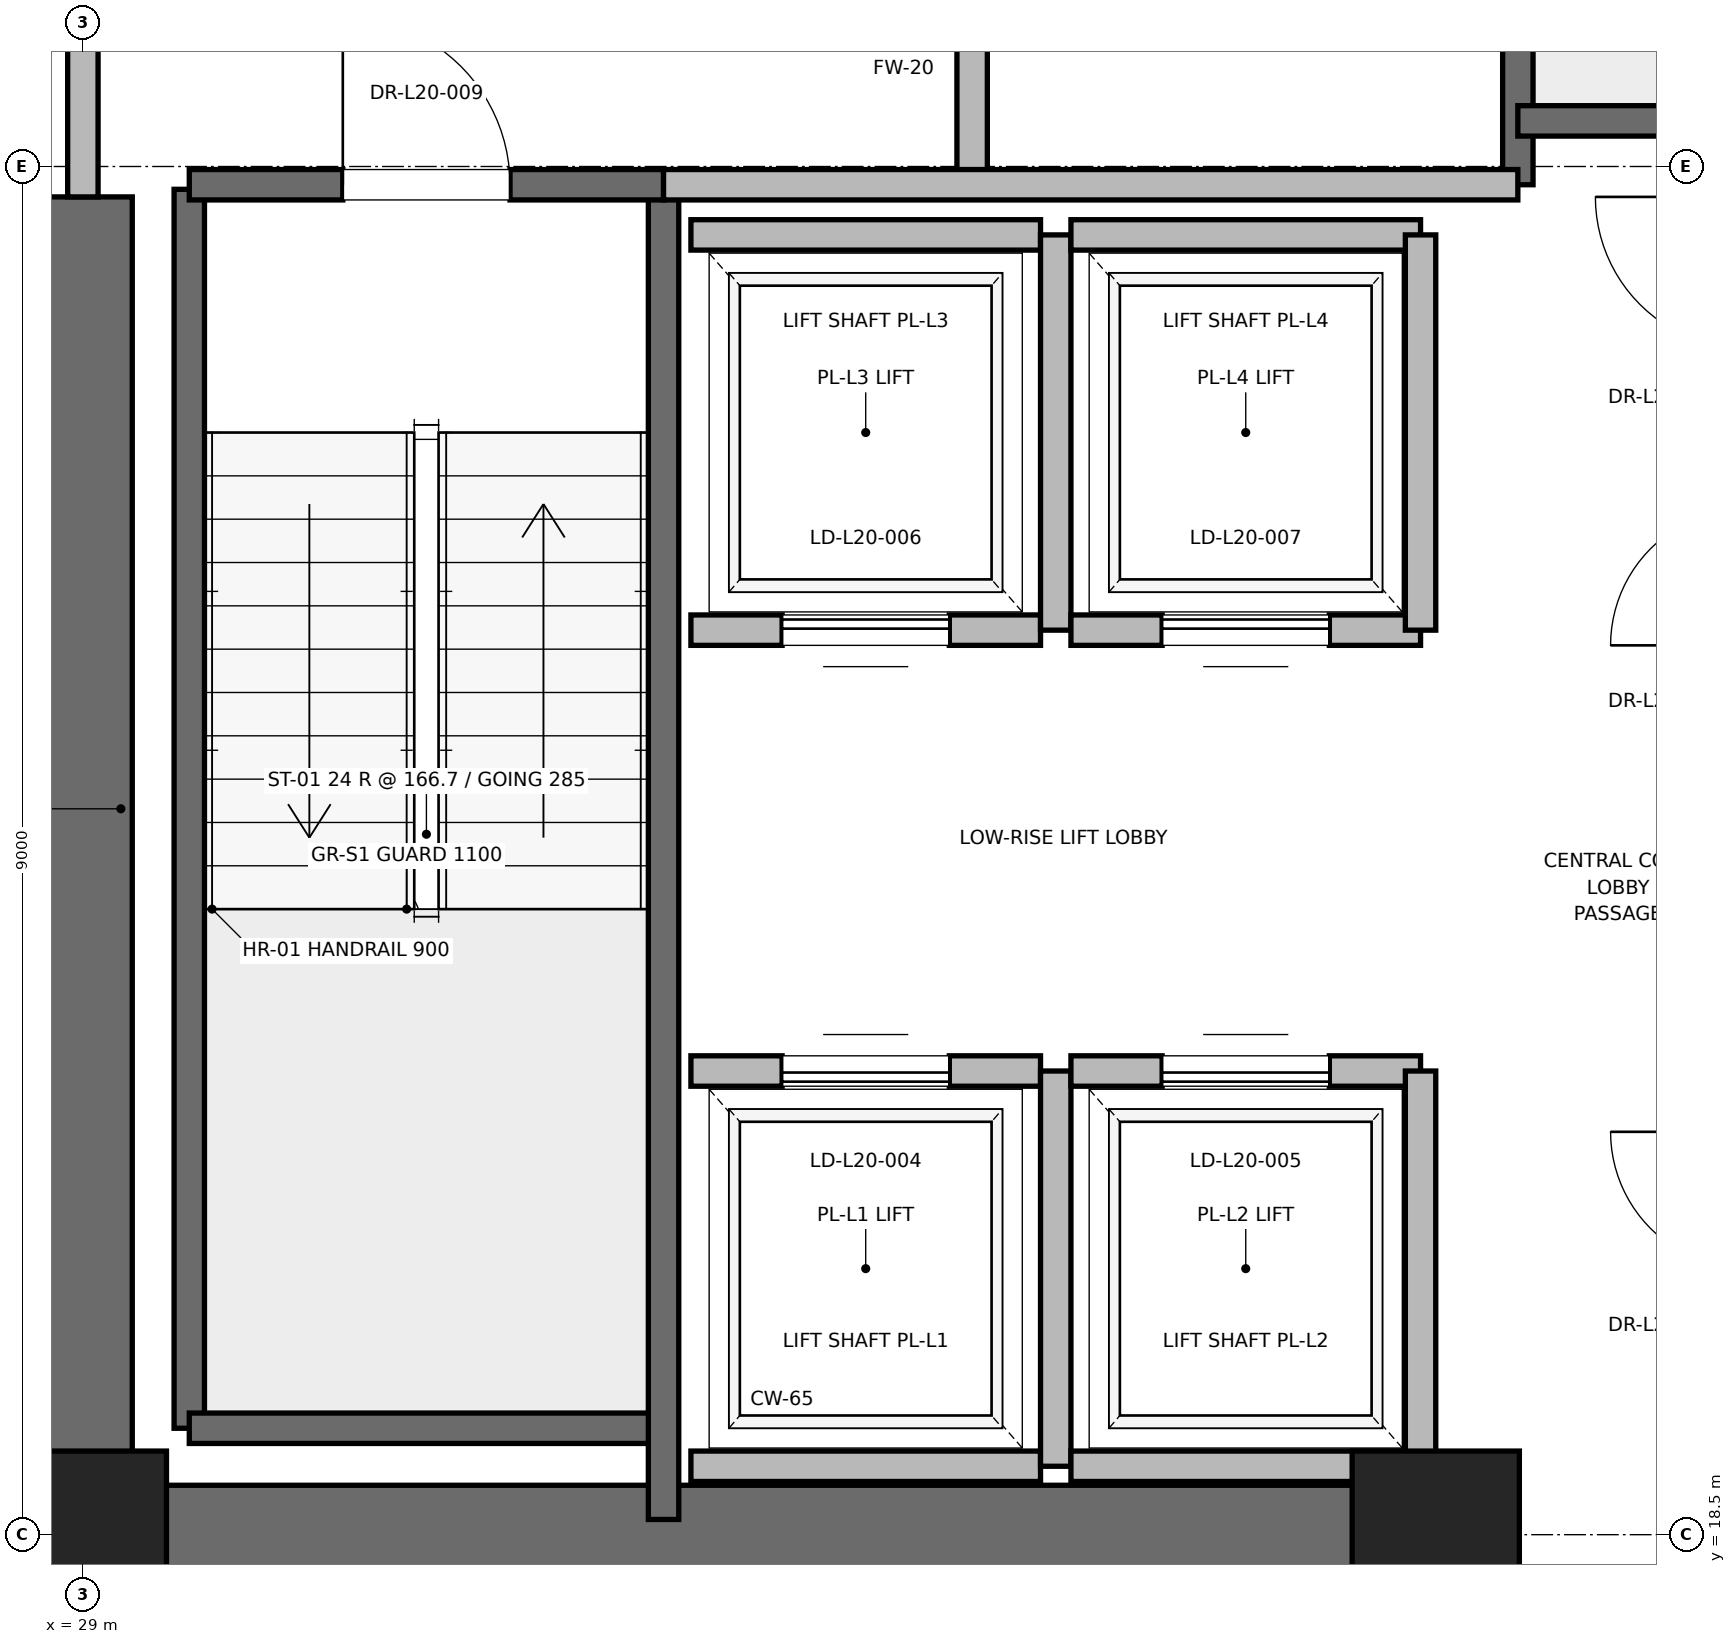
"""IFC4 building model, lengths in metres.
Left out: names, types, materials, properties, quantities, classifications, styles, units other than length and angle.
Written with IfcOpenShell. Run it as: python <this file> out.ifc"""

import sys

from ifc_helpers import new_model, si_unit, direction, frame, frame_2d, origin, origin_2d, place, context, subcontext, project, spatial, rectangle, extrude, element, fill, save


model = new_model("IFC4")
c1 = context("Model", 3, precision=1e-05, world=origin(), true_north=direction((0.0, 1.0)))
c2 = subcontext(c1, "Body", "Model", "MODEL_VIEW")
j1 = project(units=[si_unit("LENGTHUNIT", "METRE"), si_unit("PLANEANGLEUNIT", "RADIAN")], contexts=[c1])
p1 = place(None, origin())
s1 = spatial("IfcSite", under=j1, at=p1, CompositionType="ELEMENT")
p2 = place(p1, origin())
s2 = spatial("IfcBuilding", under=s1, at=p2, CompositionType="ELEMENT")
p3 = place(p2, frame((0.0, 0.0, 87.6)))
s3 = spatial("IfcBuildingStorey", under=s2, at=p3, CompositionType="ELEMENT", Elevation=87.6)
for number, where, z_axis, x_axis in (
    (1, (29.0, 18.5, 0.0), (0.0, 0.0, 1.0), (1.0, 0.0, 0.0)),
    (2, (37.9, 18.5, 0.0), (0.0, 0.0, 1.0), (1.0, 0.0, 0.0)),
):
    element("IfcColumn", number, at=place(p3, frame(where, z_axis=z_axis, x_axis=x_axis)), inside=s3, PredefinedType="PILASTER", context=c2, shape_type="SweptSolid", body=[
        extrude(rectangle(XDim=1.1, YDim=1.1, at=origin_2d()), origin(), (0.0, 0.0, 1.0), 4.0),
    ])
p4 = place(p3, frame((29.0, 18.5, 0.0), z_axis=(0.0, 0.0, 1.0), x_axis=(1.0, 0.0, 0.0)))
e3 = element("IfcWall", 3, at=p4, inside=s3, PredefinedType="SHEAR", context=c2, shape_type="SweptSolid", body=[
    extrude(rectangle(XDim=9.2, YDim=0.65, at=frame_2d((4.6, 0.0))), origin(), (0.0, 0.0, 1.0), 3.76),
])
p5 = place(p3, frame((29.0, 18.5, 0.0), z_axis=(0.0, 0.0, 1.0), x_axis=(0.0, 1.0, 0.0)))
e4 = element("IfcWall", 4, at=p5, inside=s3, PredefinedType="SHEAR", context=c2, shape_type="SweptSolid", body=[
    extrude(rectangle(XDim=8.8, YDim=0.65, at=frame_2d((4.4, 0.0))), origin(), (0.0, 0.0, 1.0), 3.76),
])
p6 = place(p3, frame((29.7, 19.2, 0.0), z_axis=(0.0, 0.0, 1.0), x_axis=(0.0, 1.0, 0.0)))
e5 = element("IfcWall", 5, at=p6, inside=s3, PredefinedType="SOLIDWALL", context=c2, shape_type="SweptSolid", body=[
    extrude(rectangle(XDim=8.15, YDim=0.2, at=frame_2d((4.075, 0.0))), origin(), (0.0, 0.0, 1.0), 3.76),
])
p7 = place(p3, frame((29.7, 19.2, 0.0), z_axis=(0.0, 0.0, 1.0), x_axis=(1.0, 0.0, 0.0)))
e6 = element("IfcWall", 6, at=p7, inside=s3, PredefinedType="SOLIDWALL", context=c2, shape_type="SweptSolid", body=[
    extrude(rectangle(XDim=3.12, YDim=0.2, at=frame_2d((1.56, 0.0))), origin(), (0.0, 0.0, 1.0), 3.76),
])
p8 = place(p3, frame((32.82, 18.6, 0.0), z_axis=(0.0, 0.0, 1.0), x_axis=(0.0, 1.0, 0.0)))
e7 = element("IfcWall", 7, at=p8, inside=s3, PredefinedType="SOLIDWALL", context=c2, shape_type="SweptSolid", body=[
    extrude(rectangle(XDim=8.78, YDim=0.2, at=frame_2d((4.39, 0.0))), origin(), (0.0, 0.0, 1.0), 3.76),
])
p9 = place(p3, frame((29.7, 27.38, 0.0), z_axis=(0.0, 0.0, 1.0), x_axis=(1.0, 0.0, 0.0)))
e8 = element("IfcWall", 8, at=p9, inside=s3, PredefinedType="SOLIDWALL", context=c2, shape_type="SweptSolid", body=[
    extrude(rectangle(XDim=3.12, YDim=0.2, at=frame_2d((1.56, 0.0))), origin(), (0.0, 0.0, 1.0), 3.76),
])
p10 = place(p9, frame((1.01, 0.0, 0.0)))
e9 = element("IfcOpeningElement", 9, at=p10, cuts=e8, PredefinedType="OPENING", context=c2, shape_type="SweptSolid", body=[
    extrude(rectangle(XDim=1.1, YDim=2.15, at=frame_2d((0.55, 1.075))), frame((0.0, 0.1, 0.0), z_axis=(0.0, -1.0, 0.0), x_axis=(1.0, 0.0, 0.0)), (0.0, 0.0, 1.0), 0.2),
])
p11 = place(p3, frame((38.44, 27.38, 0.0), z_axis=(0.0, 0.0, 1.0), x_axis=(0.0, 1.0, 0.0)))
e10 = element("IfcWall", 10, at=p11, inside=s3, PredefinedType="SOLIDWALL", context=c2, shape_type="SweptSolid", body=[
    extrude(rectangle(XDim=8.87, YDim=0.2, at=frame_2d((4.435, 0.0))), origin(), (0.0, 0.0, 1.0), 3.76),
])
p12 = place(p3, frame((38.44, 27.8, 0.0), z_axis=(0.0, 0.0, 1.0), x_axis=(1.0, 0.0, 0.0)))
e11 = element("IfcWall", 11, at=p12, inside=s3, PredefinedType="SOLIDWALL", context=c2, shape_type="SweptSolid", body=[
    extrude(rectangle(XDim=3.32, YDim=0.2, at=frame_2d((1.66, 0.0))), origin(), (0.0, 0.0, 1.0), 3.76),
])
p13 = place(p3, frame((34.85, 27.38, 0.0), z_axis=(0.0, 0.0, 1.0), x_axis=(0.0, 1.0, 0.0)))
e12 = element("IfcWall", 12, at=p13, inside=s3, PredefinedType="PARTITIONING", context=c2, shape_type="SweptSolid", body=[
    extrude(rectangle(XDim=3.37, YDim=0.2, at=frame_2d((1.685, 0.0))), origin(), (0.0, 0.0, 1.0), 3.76),
])
p14 = place(p13, frame((1.11, 0.0, 0.0)))
e13 = element("IfcOpeningElement", 13, at=p14, cuts=e12, PredefinedType="OPENING", context=c2, shape_type="SweptSolid", body=[
    extrude(rectangle(XDim=1.15, YDim=2.2, at=frame_2d((0.575, 1.1))), frame((0.0, 0.1, 0.0), z_axis=(0.0, -1.0, 0.0), x_axis=(1.0, 0.0, 0.0)), (0.0, 0.0, 1.0), 0.2),
])
p15 = place(p3, frame((29.0, 27.3, 0.0), z_axis=(0.0, 0.0, 1.0), x_axis=(0.0, 1.0, 0.0)))
e14 = element("IfcWall", 14, at=p15, inside=s3, PredefinedType="PARTITIONING", context=c2, shape_type="SweptSolid", body=[
    extrude(rectangle(XDim=3.4, YDim=0.2, at=frame_2d((1.7, 0.0))), origin(), (0.0, 0.0, 1.0), 2.54),
])
p16 = place(p15, frame((1.125, 0.0, 0.0)))
e15 = element("IfcOpeningElement", 15, at=p16, cuts=e14, PredefinedType="OPENING", context=c2, shape_type="SweptSolid", body=[
    extrude(rectangle(XDim=1.15, YDim=2.2, at=frame_2d((0.575, 1.1))), frame((0.0, 0.1, 0.0), z_axis=(0.0, -1.0, 0.0), x_axis=(1.0, 0.0, 0.0)), (0.0, 0.0, 1.0), 0.2),
])
p17 = place(p3, frame((32.82, 27.38, 0.0), z_axis=(0.0, 0.0, 1.0), x_axis=(1.0, 0.0, 0.0)))
e16 = element("IfcWall", 16, at=p17, inside=s3, PredefinedType="PARTITIONING", context=c2, shape_type="SweptSolid", body=[
    extrude(rectangle(XDim=5.62, YDim=0.2, at=frame_2d((2.81, 0.0))), origin(), (0.0, 0.0, 1.0), 3.76),
])
p18 = place(p3, frame((33.0, 18.95, 0.0), z_axis=(0.0, 0.0, 1.0), x_axis=(1.0, 0.0, 0.0)))
e17 = element("IfcWall", 17, at=p18, inside=s3, PredefinedType="SOLIDWALL", context=c2, shape_type="SweptSolid", body=[
    extrude(rectangle(XDim=2.3, YDim=0.2, at=frame_2d((1.15, 0.0))), origin(), (0.0, 0.0, 1.0), 3.76),
])
p19 = place(p3, frame((35.3, 21.55, 0.0), z_axis=(0.0, 0.0, 1.0), x_axis=(-1.0, 0.0, 0.0)))
e18 = element("IfcWall", 18, at=p19, inside=s3, PredefinedType="SOLIDWALL", context=c2, shape_type="SweptSolid", body=[
    extrude(rectangle(XDim=2.3, YDim=0.2, at=frame_2d((1.15, 0.0))), origin(), (0.0, 0.0, 1.0), 3.76),
])
p20 = place(p19, frame((0.6, 0.0, 0.0)))
e19 = element("IfcOpeningElement", 19, at=p20, cuts=e18, PredefinedType="OPENING", context=c2, shape_type="SweptSolid", body=[
    extrude(rectangle(XDim=1.1, YDim=2.2, at=frame_2d((0.55, 1.1))), frame((0.0, 0.1, 0.0), z_axis=(0.0, -1.0, 0.0), x_axis=(1.0, 0.0, 0.0)), (0.0, 0.0, 1.0), 0.2),
])
p21 = place(p3, frame((35.4, 18.95, 0.0), z_axis=(0.0, 0.0, 1.0), x_axis=(0.0, 1.0, 0.0)))
e20 = element("IfcWall", 20, at=p21, inside=s3, PredefinedType="SOLIDWALL", context=c2, shape_type="SweptSolid", body=[
    extrude(rectangle(XDim=2.6, YDim=0.2, at=frame_2d((1.3, 0.0))), origin(), (0.0, 0.0, 1.0), 3.76),
])
p22 = place(p3, frame((35.5, 18.95, 0.0), z_axis=(0.0, 0.0, 1.0), x_axis=(1.0, 0.0, 0.0)))
e21 = element("IfcWall", 21, at=p22, inside=s3, PredefinedType="SOLIDWALL", context=c2, shape_type="SweptSolid", body=[
    extrude(rectangle(XDim=2.3, YDim=0.2, at=frame_2d((1.15, 0.0))), origin(), (0.0, 0.0, 1.0), 2.54),
])
p23 = place(p3, frame((37.8, 21.55, 0.0), z_axis=(0.0, 0.0, 1.0), x_axis=(-1.0, 0.0, 0.0)))
e22 = element("IfcWall", 22, at=p23, inside=s3, PredefinedType="SOLIDWALL", context=c2, shape_type="SweptSolid", body=[
    extrude(rectangle(XDim=2.3, YDim=0.2, at=frame_2d((1.15, 0.0))), origin(), (0.0, 0.0, 1.0), 3.76),
])
p24 = place(p23, frame((0.6, 0.0, 0.0)))
e23 = element("IfcOpeningElement", 23, at=p24, cuts=e22, PredefinedType="OPENING", context=c2, shape_type="SweptSolid", body=[
    extrude(rectangle(XDim=1.1, YDim=2.2, at=frame_2d((0.55, 1.1))), frame((0.0, 0.1, 0.0), z_axis=(0.0, -1.0, 0.0), x_axis=(1.0, 0.0, 0.0)), (0.0, 0.0, 1.0), 0.2),
])
p25 = place(p3, frame((37.8, 18.95, 0.0), z_axis=(0.0, 0.0, 1.0), x_axis=(0.0, 1.0, 0.0)))
e24 = element("IfcWall", 24, at=p25, inside=s3, PredefinedType="SOLIDWALL", context=c2, shape_type="SweptSolid", body=[
    extrude(rectangle(XDim=2.6, YDim=0.2, at=frame_2d((1.3, 0.0))), origin(), (0.0, 0.0, 1.0), 2.54),
])
p26 = place(p3, frame((33.0, 24.45, 0.0), z_axis=(0.0, 0.0, 1.0), x_axis=(1.0, 0.0, 0.0)))
e25 = element("IfcWall", 25, at=p26, inside=s3, PredefinedType="SOLIDWALL", context=c2, shape_type="SweptSolid", body=[
    extrude(rectangle(XDim=2.3, YDim=0.2, at=frame_2d((1.15, 0.0))), origin(), (0.0, 0.0, 1.0), 3.76),
])
p27 = place(p26, frame((0.6, 0.0, 0.0)))
e26 = element("IfcOpeningElement", 26, at=p27, cuts=e25, PredefinedType="OPENING", context=c2, shape_type="SweptSolid", body=[
    extrude(rectangle(XDim=1.1, YDim=2.2, at=frame_2d((0.55, 1.1))), frame((0.0, 0.1, 0.0), z_axis=(0.0, -1.0, 0.0), x_axis=(1.0, 0.0, 0.0)), (0.0, 0.0, 1.0), 0.2),
])
p28 = place(p3, frame((35.3, 27.05, 0.0), z_axis=(0.0, 0.0, 1.0), x_axis=(-1.0, 0.0, 0.0)))
e27 = element("IfcWall", 27, at=p28, inside=s3, PredefinedType="SOLIDWALL", context=c2, shape_type="SweptSolid", body=[
    extrude(rectangle(XDim=2.3, YDim=0.2, at=frame_2d((1.15, 0.0))), origin(), (0.0, 0.0, 1.0), 3.76),
])
p29 = place(p3, frame((35.4, 24.45, 0.0), z_axis=(0.0, 0.0, 1.0), x_axis=(0.0, 1.0, 0.0)))
e28 = element("IfcWall", 28, at=p29, inside=s3, PredefinedType="SOLIDWALL", context=c2, shape_type="SweptSolid", body=[
    extrude(rectangle(XDim=2.6, YDim=0.2, at=frame_2d((1.3, 0.0))), origin(), (0.0, 0.0, 1.0), 3.76),
])
p30 = place(p3, frame((35.5, 24.45, 0.0), z_axis=(0.0, 0.0, 1.0), x_axis=(1.0, 0.0, 0.0)))
e29 = element("IfcWall", 29, at=p30, inside=s3, PredefinedType="SOLIDWALL", context=c2, shape_type="SweptSolid", body=[
    extrude(rectangle(XDim=2.3, YDim=0.2, at=frame_2d((1.15, 0.0))), origin(), (0.0, 0.0, 1.0), 3.76),
])
p31 = place(p30, frame((0.6, 0.0, 0.0)))
e30 = element("IfcOpeningElement", 30, at=p31, cuts=e29, PredefinedType="OPENING", context=c2, shape_type="SweptSolid", body=[
    extrude(rectangle(XDim=1.1, YDim=2.2, at=frame_2d((0.55, 1.1))), frame((0.0, 0.1, 0.0), z_axis=(0.0, -1.0, 0.0), x_axis=(1.0, 0.0, 0.0)), (0.0, 0.0, 1.0), 0.2),
])
p32 = place(p3, frame((37.8, 27.05, 0.0), z_axis=(0.0, 0.0, 1.0), x_axis=(-1.0, 0.0, 0.0)))
e31 = element("IfcWall", 31, at=p32, inside=s3, PredefinedType="SOLIDWALL", context=c2, shape_type="SweptSolid", body=[
    extrude(rectangle(XDim=2.3, YDim=0.2, at=frame_2d((1.15, 0.0))), origin(), (0.0, 0.0, 1.0), 3.76),
])
p33 = place(p3, frame((37.8, 24.45, 0.0), z_axis=(0.0, 0.0, 1.0), x_axis=(0.0, 1.0, 0.0)))
e32 = element("IfcWall", 32, at=p33, inside=s3, PredefinedType="SOLIDWALL", context=c2, shape_type="SweptSolid", body=[
    extrude(rectangle(XDim=2.6, YDim=0.2, at=frame_2d((1.3, 0.0))), origin(), (0.0, 0.0, 1.0), 3.76),
])
p34 = place(p10, origin())
e33 = element("IfcDoor", 33, at=p34, inside=s3, OperationType="SINGLE_SWING_LEFT", PredefinedType="DOOR", context=c2, shape_type="SweptSolid", body=[
    extrude(rectangle(XDim=1.1, YDim=2.15, at=frame_2d((0.55, 1.075))), frame((0.0, 0.025, 0.0), z_axis=(0.0, -1.0, 0.0), x_axis=(1.0, 0.0, 0.0)), (0.0, 0.0, 1.0), 0.05),
])
fill(e9, e33)
p35 = place(p20, origin())
e34 = element("IfcDoor", 34, at=p35, inside=s3, OperationType="SLIDING_TO_RIGHT", PredefinedType="DOOR", context=c2, shape_type="SweptSolid", body=[
    extrude(rectangle(XDim=1.1, YDim=2.2, at=frame_2d((0.55, 1.1))), frame((0.0, 0.025, 0.0), z_axis=(0.0, -1.0, 0.0), x_axis=(1.0, 0.0, 0.0)), (0.0, 0.0, 1.0), 0.05),
])
fill(e19, e34)
p36 = place(p24, origin())
e35 = element("IfcDoor", 35, at=p36, inside=s3, OperationType="SLIDING_TO_RIGHT", PredefinedType="DOOR", context=c2, shape_type="SweptSolid", body=[
    extrude(rectangle(XDim=1.1, YDim=2.2, at=frame_2d((0.55, 1.1))), frame((0.0, 0.025, 0.0), z_axis=(0.0, -1.0, 0.0), x_axis=(1.0, 0.0, 0.0)), (0.0, 0.0, 1.0), 0.05),
])
fill(e23, e35)
p37 = place(p27, origin())
e36 = element("IfcDoor", 36, at=p37, inside=s3, OperationType="SLIDING_TO_RIGHT", PredefinedType="DOOR", context=c2, shape_type="SweptSolid", body=[
    extrude(rectangle(XDim=1.1, YDim=2.2, at=frame_2d((0.55, 1.1))), frame((0.0, 0.025, 0.0), z_axis=(0.0, -1.0, 0.0), x_axis=(1.0, 0.0, 0.0)), (0.0, 0.0, 1.0), 0.05),
])
fill(e26, e36)
p38 = place(p31, origin())
e37 = element("IfcDoor", 37, at=p38, inside=s3, OperationType="SLIDING_TO_RIGHT", PredefinedType="DOOR", context=c2, shape_type="SweptSolid", body=[
    extrude(rectangle(XDim=1.1, YDim=2.2, at=frame_2d((0.55, 1.1))), frame((0.0, 0.025, 0.0), z_axis=(0.0, -1.0, 0.0), x_axis=(1.0, 0.0, 0.0)), (0.0, 0.0, 1.0), 0.05),
])
fill(e30, e37)
save(model, sys.argv[1])
